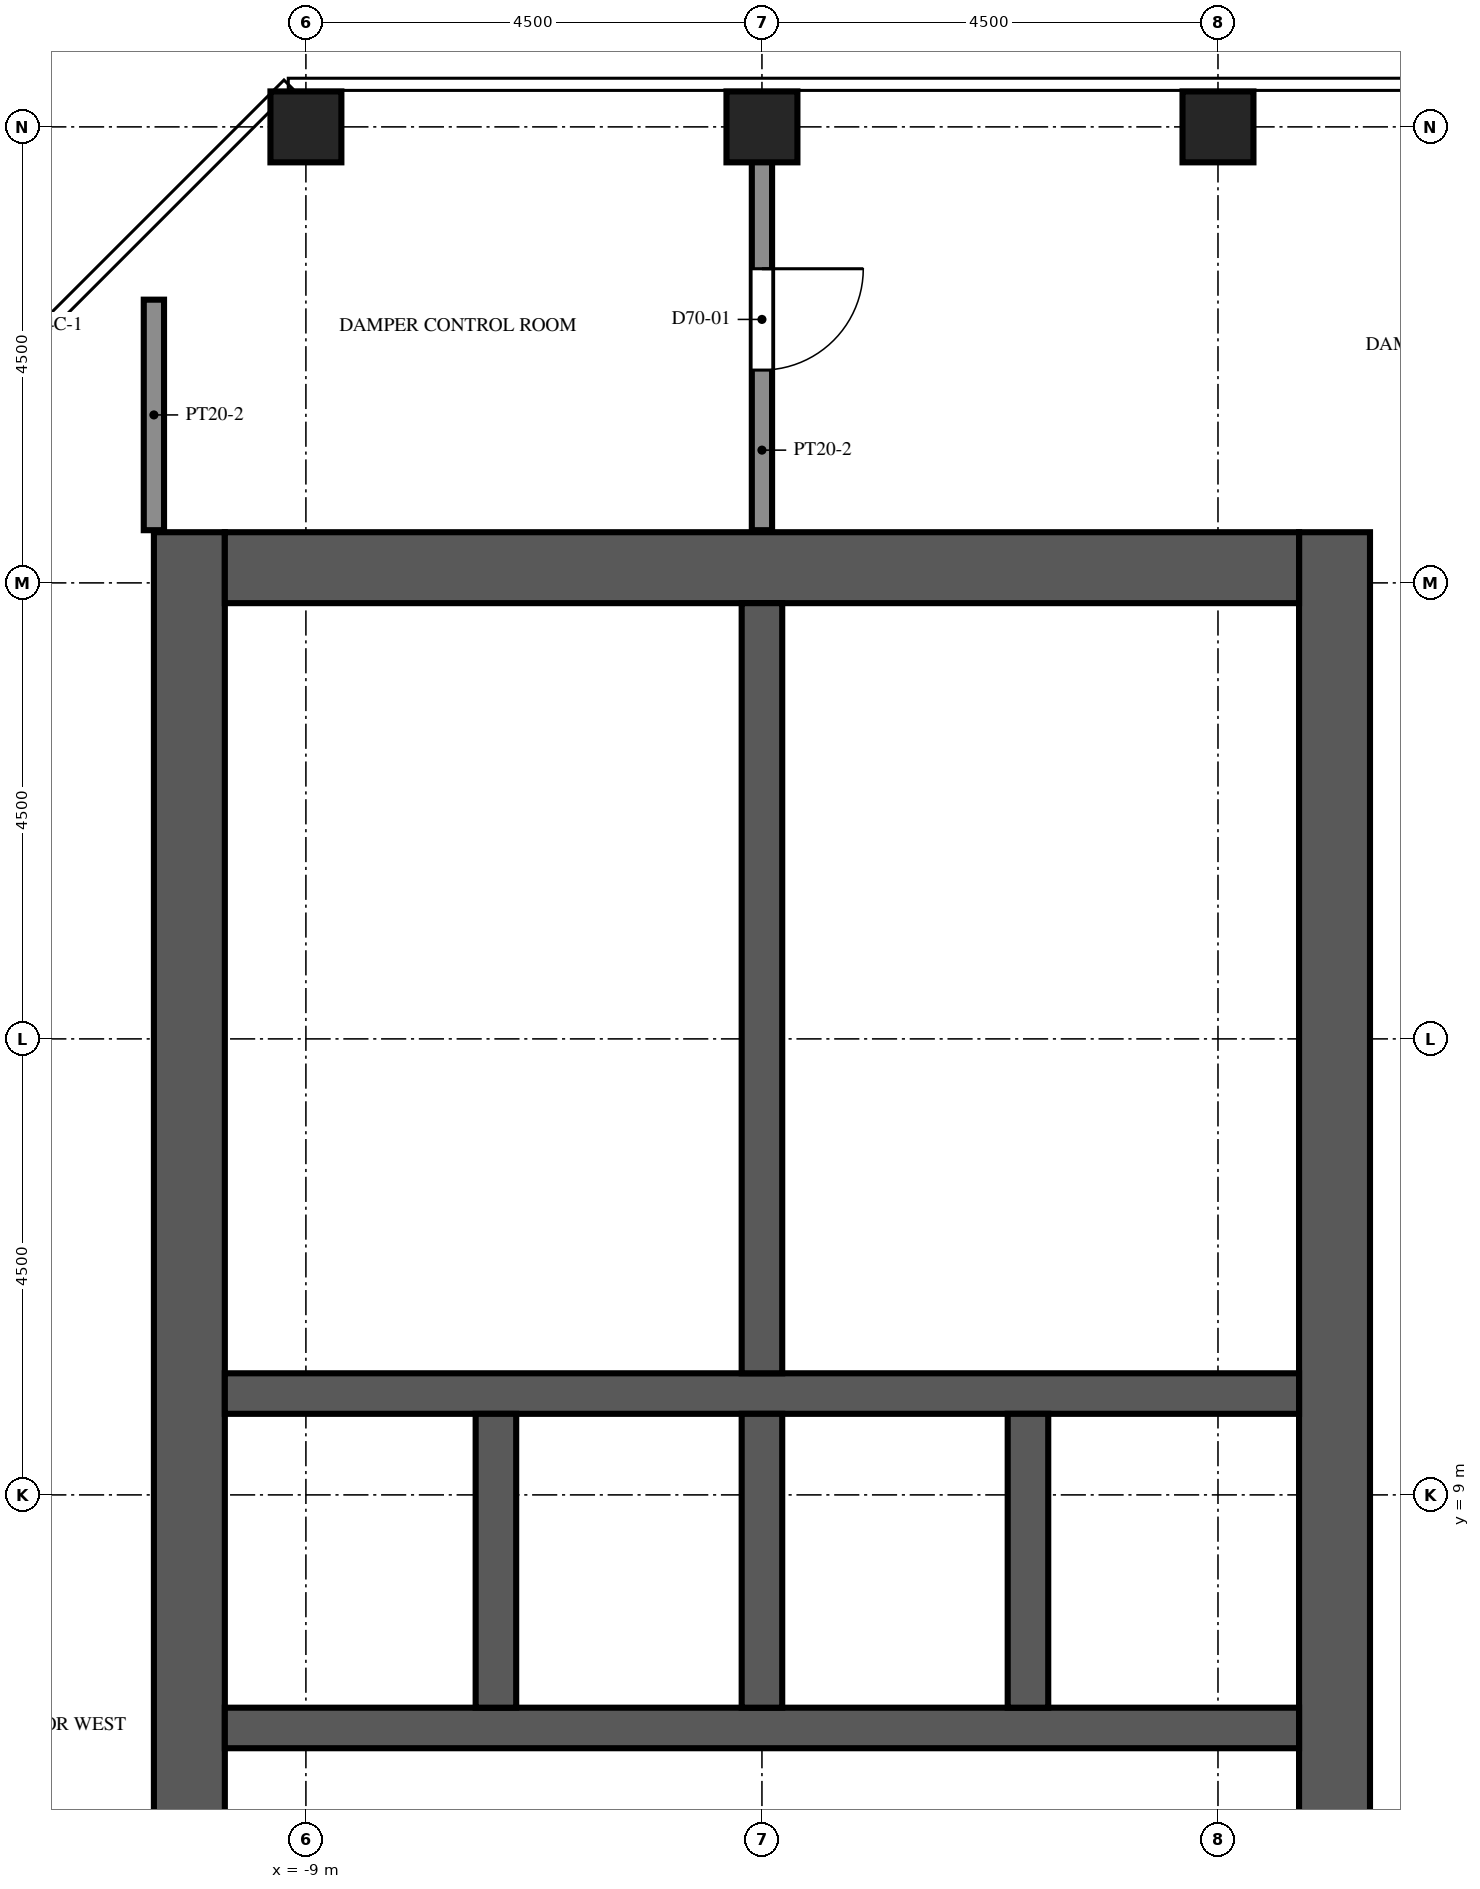
"""IFC4 building model, lengths in metres.
Left out: names, types, materials, properties, quantities, classifications, styles, units other than length and angle.
Written with IfcOpenShell. Run it as: python <this file> out.ifc"""

import sys

from ifc_helpers import new_model, si_unit, direction, frame, frame_2d, origin, origin_2d, place, context, subcontext, project, spatial, rectangle, extrude, element, fill, save


model = new_model("IFC4")
c1 = context("Model", 3, precision=1e-05, world=origin(), true_north=direction((0.0, 1.0)))
c2 = subcontext(c1, "Body", "Model", "MODEL_VIEW")
j1 = project(units=[si_unit("LENGTHUNIT", "METRE"), si_unit("PLANEANGLEUNIT", "RADIAN")], contexts=[c1])
p1 = place(None, origin())
s1 = spatial("IfcSite", under=j1, at=p1, CompositionType="ELEMENT")
p2 = place(p1, origin())
s2 = spatial("IfcBuilding", under=s1, at=p2, CompositionType="ELEMENT")
p3 = place(p2, frame((0.0, 0.0, 311.8)))
s3 = spatial("IfcBuildingStorey", under=s2, at=p3, CompositionType="ELEMENT", Elevation=311.8)
for number, where, z_axis, x_axis in (
    (1, (-9.0, 22.5, 0.0), (0.0, 0.0, 1.0), (1.0, 0.0, 0.0)),
    (2, (-4.5, 22.5, 0.0), (0.0, 0.0, 1.0), (1.0, 0.0, 0.0)),
    (3, (0.0, 22.5, 0.0), (0.0, 0.0, 1.0), (1.0, 0.0, 0.0)),
):
    element("IfcColumn", number, at=place(p3, frame(where, z_axis=z_axis, x_axis=x_axis)), inside=s3, PredefinedType="COLUMN", context=c2, shape_type="SweptSolid", body=[
        extrude(rectangle(XDim=0.7, YDim=0.7, at=origin_2d()), origin(), (0.0, 0.0, 1.0), 4.8),
    ])
p4 = place(p3, frame((-10.15, -9.0, 0.0), z_axis=(0.0, 0.0, 1.0), x_axis=(0.0, 1.0, 0.0)))
e4 = element("IfcWall", 4, at=p4, inside=s3, PredefinedType="SHEAR", context=c2, shape_type="SweptSolid", body=[
    extrude(rectangle(XDim=27.5, YDim=0.7, at=frame_2d((13.75, 0.0))), origin(), (0.0, 0.0, 1.0), 4.8),
])
p5 = place(p4, frame((12.55, 0.0, 0.0)))
e5 = element("IfcOpeningElement", 5, at=p5, cuts=e4, PredefinedType="OPENING", context=c2, shape_type="SweptSolid", body=[
    extrude(rectangle(XDim=2.4, YDim=2.4, at=frame_2d((1.2, 1.2))), frame((0.0, 0.36, 0.0), z_axis=(0.0, -1.0, 0.0), x_axis=(1.0, 0.0, 0.0)), (0.0, 0.0, 1.0), 0.72),
])
p6 = place(p4, frame((6.825, 0.0, 0.0)))
e6 = element("IfcOpeningElement", 6, at=p6, cuts=e4, PredefinedType="OPENING", context=c2, shape_type="SweptSolid", body=[
    extrude(rectangle(XDim=1.2, YDim=2.1, at=frame_2d((0.6, 1.05))), frame((0.0, 0.36, 0.0), z_axis=(0.0, -1.0, 0.0), x_axis=(1.0, 0.0, 0.0)), (0.0, 0.0, 1.0), 0.72),
])
p7 = place(p4, frame((19.475, 0.0, 0.0)))
e7 = element("IfcOpeningElement", 7, at=p7, cuts=e4, PredefinedType="OPENING", context=c2, shape_type="SweptSolid", body=[
    extrude(rectangle(XDim=1.2, YDim=2.1, at=frame_2d((0.6, 1.05))), frame((0.0, 0.36, 0.0), z_axis=(0.0, -1.0, 0.0), x_axis=(1.0, 0.0, 0.0)), (0.0, 0.0, 1.0), 0.72),
])
p8 = place(p3, frame((1.15, -9.0, 0.0), z_axis=(0.0, 0.0, 1.0), x_axis=(0.0, 1.0, 0.0)))
e8 = element("IfcWall", 8, at=p8, inside=s3, PredefinedType="SHEAR", context=c2, shape_type="SweptSolid", body=[
    extrude(rectangle(XDim=27.5, YDim=0.7, at=frame_2d((13.75, 0.0))), origin(), (0.0, 0.0, 1.0), 4.8),
])
p9 = place(p8, frame((12.55, 0.0, 0.0)))
e9 = element("IfcOpeningElement", 9, at=p9, cuts=e8, PredefinedType="OPENING", context=c2, shape_type="SweptSolid", body=[
    extrude(rectangle(XDim=2.4, YDim=2.4, at=frame_2d((1.2, 1.2))), frame((0.0, 0.36, 0.0), z_axis=(0.0, -1.0, 0.0), x_axis=(1.0, 0.0, 0.0)), (0.0, 0.0, 1.0), 0.72),
])
p10 = place(p8, frame((5.42, 0.0, 0.0)))
e10 = element("IfcOpeningElement", 10, at=p10, cuts=e8, PredefinedType="OPENING", context=c2, shape_type="SweptSolid", body=[
    extrude(rectangle(XDim=1.2, YDim=2.1, at=frame_2d((0.6, 1.05))), frame((0.0, 0.36, 0.0), z_axis=(0.0, -1.0, 0.0), x_axis=(1.0, 0.0, 0.0)), (0.0, 0.0, 1.0), 0.72),
])
p11 = place(p8, frame((19.46, 0.0, 0.0)))
e11 = element("IfcOpeningElement", 11, at=p11, cuts=e8, PredefinedType="OPENING", context=c2, shape_type="SweptSolid", body=[
    extrude(rectangle(XDim=1.0, YDim=2.1, at=frame_2d((0.5, 1.05))), frame((0.0, 0.36, 0.0), z_axis=(0.0, -1.0, 0.0), x_axis=(1.0, 0.0, 0.0)), (0.0, 0.0, 1.0), 0.72),
])
p12 = place(p8, frame((21.17, 0.0, 0.0)))
e12 = element("IfcOpeningElement", 12, at=p12, cuts=e8, PredefinedType="OPENING", context=c2, shape_type="SweptSolid", body=[
    extrude(rectangle(XDim=1.0, YDim=2.1, at=frame_2d((0.5, 1.05))), frame((0.0, 0.36, 0.0), z_axis=(0.0, -1.0, 0.0), x_axis=(1.0, 0.0, 0.0)), (0.0, 0.0, 1.0), 0.72),
])
p13 = place(p8, frame((23.26, 0.0, 0.0)))
e13 = element("IfcOpeningElement", 13, at=p13, cuts=e8, PredefinedType="OPENING", context=c2, shape_type="SweptSolid", body=[
    extrude(rectangle(XDim=1.0, YDim=2.1, at=frame_2d((0.5, 1.05))), frame((0.0, 0.36, 0.0), z_axis=(0.0, -1.0, 0.0), x_axis=(1.0, 0.0, 0.0)), (0.0, 0.0, 1.0), 0.72),
])
p14 = place(p8, frame((25.35, 0.0, 0.0)))
e14 = element("IfcOpeningElement", 14, at=p14, cuts=e8, PredefinedType="OPENING", context=c2, shape_type="SweptSolid", body=[
    extrude(rectangle(XDim=1.0, YDim=2.1, at=frame_2d((0.5, 1.05))), frame((0.0, 0.36, 0.0), z_axis=(0.0, -1.0, 0.0), x_axis=(1.0, 0.0, 0.0)), (0.0, 0.0, 1.0), 0.72),
])
p15 = place(p3, frame((-9.8, 18.15, 0.0), z_axis=(0.0, 0.0, 1.0), x_axis=(1.0, 0.0, 0.0)))
e15 = element("IfcWall", 15, at=p15, inside=s3, PredefinedType="SHEAR", context=c2, shape_type="SweptSolid", body=[
    extrude(rectangle(XDim=10.6, YDim=0.7, at=frame_2d((5.3, 0.0))), origin(), (0.0, 0.0, 1.0), 4.8),
])
p16 = place(p3, frame((-9.8, 6.7, 0.0), z_axis=(0.0, 0.0, 1.0), x_axis=(1.0, 0.0, 0.0)))
e16 = element("IfcWall", 16, at=p16, inside=s3, PredefinedType="SHEAR", context=c2, shape_type="SweptSolid", body=[
    extrude(rectangle(XDim=10.6, YDim=0.4, at=frame_2d((5.3, 0.0))), origin(), (0.0, 0.0, 1.0), 4.8),
])
p17 = place(p16, frame((0.738, 0.0, 0.0)))
e17 = element("IfcOpeningElement", 17, at=p17, cuts=e16, PredefinedType="OPENING", context=c2, shape_type="SweptSolid", body=[
    extrude(rectangle(XDim=1.0, YDim=2.1, at=frame_2d((0.5, 1.05))), frame((0.0, 0.21, 0.0), z_axis=(0.0, -1.0, 0.0), x_axis=(1.0, 0.0, 0.0)), (0.0, 0.0, 1.0), 0.42),
])
p18 = place(p16, frame((3.488, 0.0, 0.0)))
e18 = element("IfcOpeningElement", 18, at=p18, cuts=e16, PredefinedType="OPENING", context=c2, shape_type="SweptSolid", body=[
    extrude(rectangle(XDim=1.0, YDim=2.1, at=frame_2d((0.5, 1.05))), frame((0.0, 0.21, 0.0), z_axis=(0.0, -1.0, 0.0), x_axis=(1.0, 0.0, 0.0)), (0.0, 0.0, 1.0), 0.42),
])
p19 = place(p16, frame((6.113, 0.0, 0.0)))
e19 = element("IfcOpeningElement", 19, at=p19, cuts=e16, PredefinedType="OPENING", context=c2, shape_type="SweptSolid", body=[
    extrude(rectangle(XDim=1.0, YDim=2.1, at=frame_2d((0.5, 1.05))), frame((0.0, 0.21, 0.0), z_axis=(0.0, -1.0, 0.0), x_axis=(1.0, 0.0, 0.0)), (0.0, 0.0, 1.0), 0.42),
])
p20 = place(p16, frame((8.863, 0.0, 0.0)))
e20 = element("IfcOpeningElement", 20, at=p20, cuts=e16, PredefinedType="OPENING", context=c2, shape_type="SweptSolid", body=[
    extrude(rectangle(XDim=1.0, YDim=2.1, at=frame_2d((0.5, 1.05))), frame((0.0, 0.21, 0.0), z_axis=(0.0, -1.0, 0.0), x_axis=(1.0, 0.0, 0.0)), (0.0, 0.0, 1.0), 0.42),
])
p21 = place(p3, frame((-9.8, 10.0, 0.0), z_axis=(0.0, 0.0, 1.0), x_axis=(1.0, 0.0, 0.0)))
e21 = element("IfcWall", 21, at=p21, inside=s3, PredefinedType="SHEAR", context=c2, shape_type="SweptSolid", body=[
    extrude(rectangle(XDim=10.6, YDim=0.4, at=frame_2d((5.3, 0.0))), origin(), (0.0, 0.0, 1.0), 4.8),
])
for number, where, z_axis, x_axis in (
    (22, (-7.125, 6.9, 0.0), (0.0, 0.0, 1.0), (0.0, 1.0, 0.0)),
    (23, (-4.5, 6.9, 0.0), (0.0, 0.0, 1.0), (0.0, 1.0, 0.0)),
    (24, (-1.875, 6.9, 0.0), (0.0, 0.0, 1.0), (0.0, 1.0, 0.0)),
):
    element("IfcWall", number, at=place(p3, frame(where, z_axis=z_axis, x_axis=x_axis)), inside=s3, PredefinedType="SHEAR", context=c2, shape_type="SweptSolid", body=[
        extrude(rectangle(XDim=2.9, YDim=0.4, at=frame_2d((1.45, 0.0))), origin(), (0.0, 0.0, 1.0), 4.8),
    ])
p22 = place(p3, frame((-4.5, 10.2, 0.0), z_axis=(0.0, 0.0, 1.0), x_axis=(0.0, 1.0, 0.0)))
e25 = element("IfcWall", 25, at=p22, inside=s3, PredefinedType="SHEAR", context=c2, shape_type="SweptSolid", body=[
    extrude(rectangle(XDim=7.6, YDim=0.4, at=frame_2d((3.8, 0.0))), origin(), (0.0, 0.0, 1.0), 4.8),
])
p23 = place(p3, frame((-10.5, 18.52, 0.0), z_axis=(0.0, 0.0, 1.0), x_axis=(0.0, 1.0, 0.0)))
e26 = element("IfcWall", 26, at=p23, inside=s3, PredefinedType="PARTITIONING", context=c2, shape_type="SweptSolid", body=[
    extrude(rectangle(XDim=2.275, YDim=0.2, at=frame_2d((1.137, 0.0))), origin(), (0.0, 0.0, 1.0), 4.2),
])
p24 = place(p3, frame((-4.5, 22.355, 0.0), z_axis=(0.0, 0.0, 1.0), x_axis=(0.0, -1.0, 0.0)))
e27 = element("IfcWall", 27, at=p24, inside=s3, PredefinedType="PARTITIONING", context=c2, shape_type="SweptSolid", body=[
    extrude(rectangle(XDim=3.835, YDim=0.2, at=frame_2d((1.917, 0.0))), origin(), (0.0, 0.0, 1.0), 4.2),
])
p25 = place(p24, frame((1.255, 0.0, 0.0)))
e28 = element("IfcOpeningElement", 28, at=p25, cuts=e27, PredefinedType="OPENING", context=c2, shape_type="SweptSolid", body=[
    extrude(rectangle(XDim=1.0, YDim=2.1, at=frame_2d((0.5, 1.05))), frame((0.0, 0.11, 0.0), z_axis=(0.0, -1.0, 0.0), x_axis=(1.0, 0.0, 0.0)), (0.0, 0.0, 1.0), 0.22),
])
for number, where, z_axis, x_axis in (
    (29, (-4.3, 11.72, 0.0), (0.0, 0.0, 1.0), (1.0, 0.0, 0.0)),
    (30, (-4.3, 13.62, 0.0), (0.0, 0.0, 1.0), (1.0, 0.0, 0.0)),
    (31, (-4.3, 15.9, 0.0), (0.0, 0.0, 1.0), (1.0, 0.0, 0.0)),
):
    element("IfcWall", number, at=place(p3, frame(where, z_axis=z_axis, x_axis=x_axis)), inside=s3, PredefinedType="PARTITIONING", context=c2, shape_type="SweptSolid", body=[
        extrude(rectangle(XDim=5.1, YDim=0.1, at=frame_2d((2.55, 0.0))), origin(), (0.0, 0.0, 1.0), 4.2),
    ])
p26 = place(p25, origin())
e32 = element("IfcDoor", 32, at=p26, inside=s3, OperationType="SINGLE_SWING_LEFT", PredefinedType="DOOR", context=c2, shape_type="SweptSolid", body=[
    extrude(rectangle(XDim=1.0, YDim=2.1, at=frame_2d((0.5, 1.05))), frame((0.0, 0.025, 0.0), z_axis=(0.0, -1.0, 0.0), x_axis=(1.0, 0.0, 0.0)), (0.0, 0.0, 1.0), 0.05),
])
fill(e28, e32)
p27 = place(p5, origin())
e33 = element("IfcDoor", 33, at=p27, inside=s3, OperationType="DOUBLE_DOOR_DOUBLE_SWING", PredefinedType="DOOR", context=c2, shape_type="SweptSolid", body=[
    extrude(rectangle(XDim=2.4, YDim=2.4, at=frame_2d((1.2, 1.2))), frame((0.0, 0.025, 0.0), z_axis=(0.0, -1.0, 0.0), x_axis=(1.0, 0.0, 0.0)), (0.0, 0.0, 1.0), 0.05),
])
fill(e5, e33)
p28 = place(p9, origin())
e34 = element("IfcDoor", 34, at=p28, inside=s3, OperationType="DOUBLE_DOOR_DOUBLE_SWING", PredefinedType="DOOR", context=c2, shape_type="SweptSolid", body=[
    extrude(rectangle(XDim=2.4, YDim=2.4, at=frame_2d((1.2, 1.2))), frame((0.0, 0.025, 0.0), z_axis=(0.0, -1.0, 0.0), x_axis=(1.0, 0.0, 0.0)), (0.0, 0.0, 1.0), 0.05),
])
fill(e9, e34)
p29 = place(p7, origin())
e35 = element("IfcDoor", 35, at=p29, inside=s3, OperationType="SINGLE_SWING_LEFT", PredefinedType="DOOR", context=c2, shape_type="SweptSolid", body=[
    extrude(rectangle(XDim=1.2, YDim=2.1, at=frame_2d((0.6, 1.05))), frame((0.0, 0.025, 0.0), z_axis=(0.0, -1.0, 0.0), x_axis=(1.0, 0.0, 0.0)), (0.0, 0.0, 1.0), 0.05),
])
fill(e7, e35)
p30 = place(p17, origin())
e36 = element("IfcDoor", 36, at=p30, inside=s3, OperationType="SINGLE_SWING_LEFT", PredefinedType="DOOR", context=c2, shape_type="SweptSolid", body=[
    extrude(rectangle(XDim=1.0, YDim=2.1, at=frame_2d((0.5, 1.05))), frame((0.0, 0.025, 0.0), z_axis=(0.0, -1.0, 0.0), x_axis=(1.0, 0.0, 0.0)), (0.0, 0.0, 1.0), 0.05),
])
fill(e17, e36)
p31 = place(p18, origin())
e37 = element("IfcDoor", 37, at=p31, inside=s3, OperationType="SINGLE_SWING_RIGHT", PredefinedType="DOOR", context=c2, shape_type="SweptSolid", body=[
    extrude(rectangle(XDim=1.0, YDim=2.1, at=frame_2d((0.5, 1.05))), frame((0.0, 0.025, 0.0), z_axis=(0.0, -1.0, 0.0), x_axis=(1.0, 0.0, 0.0)), (0.0, 0.0, 1.0), 0.05),
])
fill(e18, e37)
p32 = place(p19, origin())
e38 = element("IfcDoor", 38, at=p32, inside=s3, OperationType="SINGLE_SWING_LEFT", PredefinedType="DOOR", context=c2, shape_type="SweptSolid", body=[
    extrude(rectangle(XDim=1.0, YDim=2.1, at=frame_2d((0.5, 1.05))), frame((0.0, 0.025, 0.0), z_axis=(0.0, -1.0, 0.0), x_axis=(1.0, 0.0, 0.0)), (0.0, 0.0, 1.0), 0.05),
])
fill(e19, e38)
p33 = place(p20, origin())
e39 = element("IfcDoor", 39, at=p33, inside=s3, OperationType="SINGLE_SWING_RIGHT", PredefinedType="DOOR", context=c2, shape_type="SweptSolid", body=[
    extrude(rectangle(XDim=1.0, YDim=2.1, at=frame_2d((0.5, 1.05))), frame((0.0, 0.025, 0.0), z_axis=(0.0, -1.0, 0.0), x_axis=(1.0, 0.0, 0.0)), (0.0, 0.0, 1.0), 0.05),
])
fill(e20, e39)
p34 = place(p11, origin())
e40 = element("IfcDoor", 40, at=p34, inside=s3, OperationType="SINGLE_SWING_LEFT", PredefinedType="DOOR", context=c2, shape_type="SweptSolid", body=[
    extrude(rectangle(XDim=1.0, YDim=2.1, at=frame_2d((0.5, 1.05))), frame((0.0, 0.325, 0.0), z_axis=(0.0, -1.0, 0.0), x_axis=(1.0, 0.0, 0.0)), (0.0, 0.0, 1.0), 0.05),
])
fill(e11, e40)
p35 = place(p12, origin())
e41 = element("IfcDoor", 41, at=p35, inside=s3, OperationType="SINGLE_SWING_RIGHT", PredefinedType="DOOR", context=c2, shape_type="SweptSolid", body=[
    extrude(rectangle(XDim=1.0, YDim=2.1, at=frame_2d((0.5, 1.05))), frame((0.0, 0.325, 0.0), z_axis=(0.0, -1.0, 0.0), x_axis=(1.0, 0.0, 0.0)), (0.0, 0.0, 1.0), 0.05),
])
fill(e12, e41)
p36 = place(p13, origin())
e42 = element("IfcDoor", 42, at=p36, inside=s3, OperationType="SINGLE_SWING_LEFT", PredefinedType="DOOR", context=c2, shape_type="SweptSolid", body=[
    extrude(rectangle(XDim=1.0, YDim=2.1, at=frame_2d((0.5, 1.05))), frame((0.0, 0.325, 0.0), z_axis=(0.0, -1.0, 0.0), x_axis=(1.0, 0.0, 0.0)), (0.0, 0.0, 1.0), 0.05),
])
fill(e13, e42)
p37 = place(p14, origin())
e43 = element("IfcDoor", 43, at=p37, inside=s3, OperationType="SINGLE_SWING_RIGHT", PredefinedType="DOOR", context=c2, shape_type="SweptSolid", body=[
    extrude(rectangle(XDim=1.0, YDim=2.1, at=frame_2d((0.5, 1.05))), frame((0.0, 0.325, 0.0), z_axis=(0.0, -1.0, 0.0), x_axis=(1.0, 0.0, 0.0)), (0.0, 0.0, 1.0), 0.05),
])
fill(e14, e43)
save(model, sys.argv[1])
